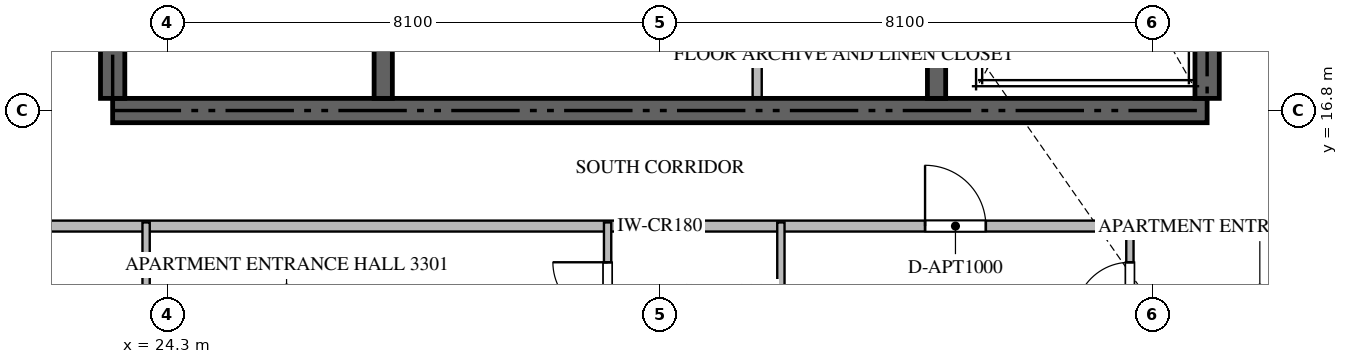
"""IFC4 building model, lengths in metres.
Left out: names, types, materials, properties, quantities, classifications, styles, units other than length and angle.
Written with IfcOpenShell. Run it as: python <this file> out.ifc"""

import sys

from ifc_helpers import new_model, si_unit, direction, frame, frame_2d, origin, place, context, subcontext, project, spatial, rectangle, extrude, source, transform, mapped, element, fill, save


model = new_model("IFC4")
c1 = context("Model", 3, precision=1e-05, world=origin(), true_north=direction((0.0, 1.0)))
c2 = subcontext(c1, "Body", "Model", "MODEL_VIEW")
j1 = project(units=[si_unit("LENGTHUNIT", "METRE"), si_unit("PLANEANGLEUNIT", "RADIAN")], contexts=[c1])
p1 = place(None, origin())
s1 = spatial("IfcSite", under=j1, at=p1, CompositionType="ELEMENT")
p2 = place(p1, origin())
s2 = spatial("IfcBuilding", under=s1, at=p2, CompositionType="ELEMENT")
p3 = place(p2, frame((0.0, 0.0, 135.15)))
s3 = spatial("IfcBuildingStorey", under=s2, at=p3, CompositionType="ELEMENT", Elevation=135.15)
p4 = place(p3, frame((23.4, 16.8, -0.26), z_axis=(0.0, 0.0, 1.0), x_axis=(1.0, 0.0, 0.0)))
e1 = element("IfcWall", 1, at=p4, inside=s3, PredefinedType="SHEAR", context=c2, shape_type="SweptSolid", body=[
    extrude(rectangle(XDim=18.0, YDim=0.4, at=frame_2d((9.0, 0.0))), origin(), (0.0, 0.0, 1.0), 3.748),
])
p5 = place(p3, frame((23.4, 17.0, -0.26), z_axis=(0.0, 0.0, 1.0), x_axis=(0.0, 1.0, 0.0)))
e2 = element("IfcWall", 2, at=p5, inside=s3, PredefinedType="SHEAR", context=c2, shape_type="SweptSolid", body=[
    extrude(rectangle(XDim=4.85, YDim=0.4, at=frame_2d((2.425, 0.0))), origin(), (0.0, 0.0, 1.0), 3.748),
])
p6 = place(p3, frame((41.4, 17.0, -0.26), z_axis=(0.0, 0.0, 1.0), x_axis=(0.0, 1.0, 0.0)))
e3 = element("IfcWall", 3, at=p6, inside=s3, PredefinedType="SHEAR", context=c2, shape_type="SweptSolid", body=[
    extrude(rectangle(XDim=8.35, YDim=0.4, at=frame_2d((4.175, 0.0))), origin(), (0.0, 0.0, 1.0), 3.748),
])
p7 = place(p3, frame((27.85, 17.0, -0.26), z_axis=(0.0, 0.0, 1.0), x_axis=(0.0, 1.0, 0.0)))
e4 = element("IfcWall", 4, at=p7, inside=s3, PredefinedType="SHEAR", context=c2, shape_type="SweptSolid", body=[
    extrude(rectangle(XDim=4.85, YDim=0.3, at=frame_2d((2.425, 0.0))), origin(), (0.0, 0.0, 1.0), 3.748),
])
p8 = place(p3, frame((36.95, 17.0, -0.26), z_axis=(0.0, 0.0, 1.0), x_axis=(0.0, 1.0, 0.0)))
e5 = element("IfcWall", 5, at=p8, inside=s3, PredefinedType="SHEAR", context=c2, shape_type="SweptSolid", body=[
    extrude(rectangle(XDim=8.35, YDim=0.3, at=frame_2d((4.175, 0.0))), origin(), (0.0, 0.0, 1.0), 3.748),
])
p9 = place(p3, frame((34.0, 17.02, 0.0), z_axis=(0.0, 0.0, 1.0), x_axis=(0.0, 1.0, 0.0)))
e6 = element("IfcWall", 6, at=p9, inside=s3, PredefinedType="PARTITIONING", context=c2, shape_type="SweptSolid", body=[
    extrude(rectangle(XDim=2.73, YDim=0.15, at=frame_2d((1.365, 0.0))), origin(), (0.0, 0.0, 1.0), 3.49),
])
p10 = place(p3, frame((20.952, 14.9, 0.0), z_axis=(0.0, 0.0, 1.0), x_axis=(1.0, 0.0, 0.0)))
e7 = element("IfcWall", 7, at=p10, inside=s3, PredefinedType="PARTITIONING", context=c2, shape_type="SweptSolid", body=[
    extrude(rectangle(XDim=22.896, YDim=0.18, at=frame_2d((11.448, 0.0))), origin(), (0.0, 0.0, 1.0), 3.49),
])
p11 = place(p10, frame((15.809, 0.0, 0.0)))
e8 = element("IfcOpeningElement", 8, at=p11, cuts=e7, PredefinedType="OPENING", context=c2, shape_type="SweptSolid", body=[
    extrude(rectangle(XDim=1.0, YDim=2.15, at=frame_2d((0.5, 1.075))), frame((0.0, 0.1, 0.0), z_axis=(0.0, -1.0, 0.0), x_axis=(1.0, 0.0, 0.0)), (0.0, 0.0, 1.0), 0.2),
])
p12 = place(p3, frame((34.39, 12.15, 0.0), z_axis=(0.0, 0.0, 1.0), x_axis=(0.0, 1.0, 0.0)))
e9 = element("IfcWall", 9, at=p12, inside=s3, PredefinedType="PARTITIONING", context=c2, shape_type="SweptSolid", body=[
    extrude(rectangle(XDim=2.81, YDim=0.12, at=frame_2d((1.405, 0.0))), origin(), (0.0, 0.0, 1.0), 3.49),
])
p13 = place(p3, frame((31.54, 12.75, 0.0), z_axis=(0.0, 0.0, 1.0), x_axis=(0.0, 1.0, 0.0)))
e10 = element("IfcWall", 10, at=p13, inside=s3, PredefinedType="PARTITIONING", context=c2, shape_type="SweptSolid", body=[
    extrude(rectangle(XDim=2.21, YDim=0.12, at=frame_2d((1.105, 0.0))), origin(), (0.0, 0.0, 1.0), 3.49),
])
p14 = place(p13, frame((0.655, 0.0, 0.0)))
e11 = element("IfcOpeningElement", 11, at=p14, cuts=e10, PredefinedType="OPENING", context=c2, shape_type="SweptSolid", body=[
    extrude(rectangle(XDim=0.9, YDim=2.1, at=frame_2d((0.45, 1.05))), frame((0.0, 0.07, 0.0), z_axis=(0.0, -1.0, 0.0), x_axis=(1.0, 0.0, 0.0)), (0.0, 0.0, 1.0), 0.14),
])
p15 = place(p3, frame((23.95, 12.752, 0.0), z_axis=(0.0, 0.0, 1.0), x_axis=(0.0, 1.0, 0.0)))
e12 = element("IfcWall", 12, at=p15, inside=s3, PredefinedType="PARTITIONING", context=c2, shape_type="SweptSolid", body=[
    extrude(rectangle(XDim=2.208, YDim=0.12, at=frame_2d((1.104, 0.0))), origin(), (0.0, 0.0, 1.0), 3.49),
])
p16 = place(p3, frame((40.13, 12.75, 0.0), z_axis=(0.0, 0.0, 1.0), x_axis=(0.0, 1.0, 0.0)))
e13 = element("IfcWall", 13, at=p16, inside=s3, PredefinedType="PARTITIONING", context=c2, shape_type="SweptSolid", body=[
    extrude(rectangle(XDim=2.21, YDim=0.12, at=frame_2d((1.105, 0.0))), origin(), (0.0, 0.0, 1.0), 3.49),
])
p17 = place(p16, frame((0.655, 0.0, 0.0)))
e14 = element("IfcOpeningElement", 14, at=p17, cuts=e13, PredefinedType="OPENING", context=c2, shape_type="SweptSolid", body=[
    extrude(rectangle(XDim=0.9, YDim=2.1, at=frame_2d((0.45, 1.05))), frame((0.0, 0.07, 0.0), z_axis=(0.0, -1.0, 0.0), x_axis=(1.0, 0.0, 0.0)), (0.0, 0.0, 1.0), 0.14),
])
m1 = source(origin(), c2, "Body", "SweptSolid", [
    extrude(rectangle(XDim=1.0, YDim=2.15, at=frame_2d((0.5, 1.075))), frame((0.0, 0.025, 0.0), z_axis=(0.0, -1.0, 0.0), x_axis=(1.0, 0.0, 0.0)), (0.0, 0.0, 1.0), 0.05),
])
p18 = place(p11, origin())
e15 = element("IfcDoor", 15, at=p18, inside=s3, OperationType="SINGLE_SWING_LEFT", PredefinedType="DOOR", context=c2, shape_type="MappedRepresentation", body=[
    mapped(m1, transform((0.0, 0.0, 0.0), scale=1.0)),
])
fill(e8, e15)
m2 = source(origin(), c2, "Body", "SweptSolid", [
    extrude(rectangle(XDim=0.9, YDim=2.1, at=frame_2d((0.45, 1.05))), frame((0.0, 0.025, 0.0), z_axis=(0.0, -1.0, 0.0), x_axis=(1.0, 0.0, 0.0)), (0.0, 0.0, 1.0), 0.05),
])
p19 = place(p14, origin())
e16 = element("IfcDoor", 16, at=p19, inside=s3, OperationType="SINGLE_SWING_RIGHT", PredefinedType="DOOR", context=c2, shape_type="MappedRepresentation", body=[
    mapped(m2, transform((0.0, 0.0, 0.0), scale=1.0)),
])
fill(e11, e16)
p20 = place(p17, origin())
e17 = element("IfcDoor", 17, at=p20, inside=s3, OperationType="SINGLE_SWING_LEFT", PredefinedType="DOOR", context=c2, shape_type="MappedRepresentation", body=[
    mapped(m2, transform((0.0, 0.0, 0.0), scale=1.0)),
])
fill(e14, e17)
save(model, sys.argv[1])
